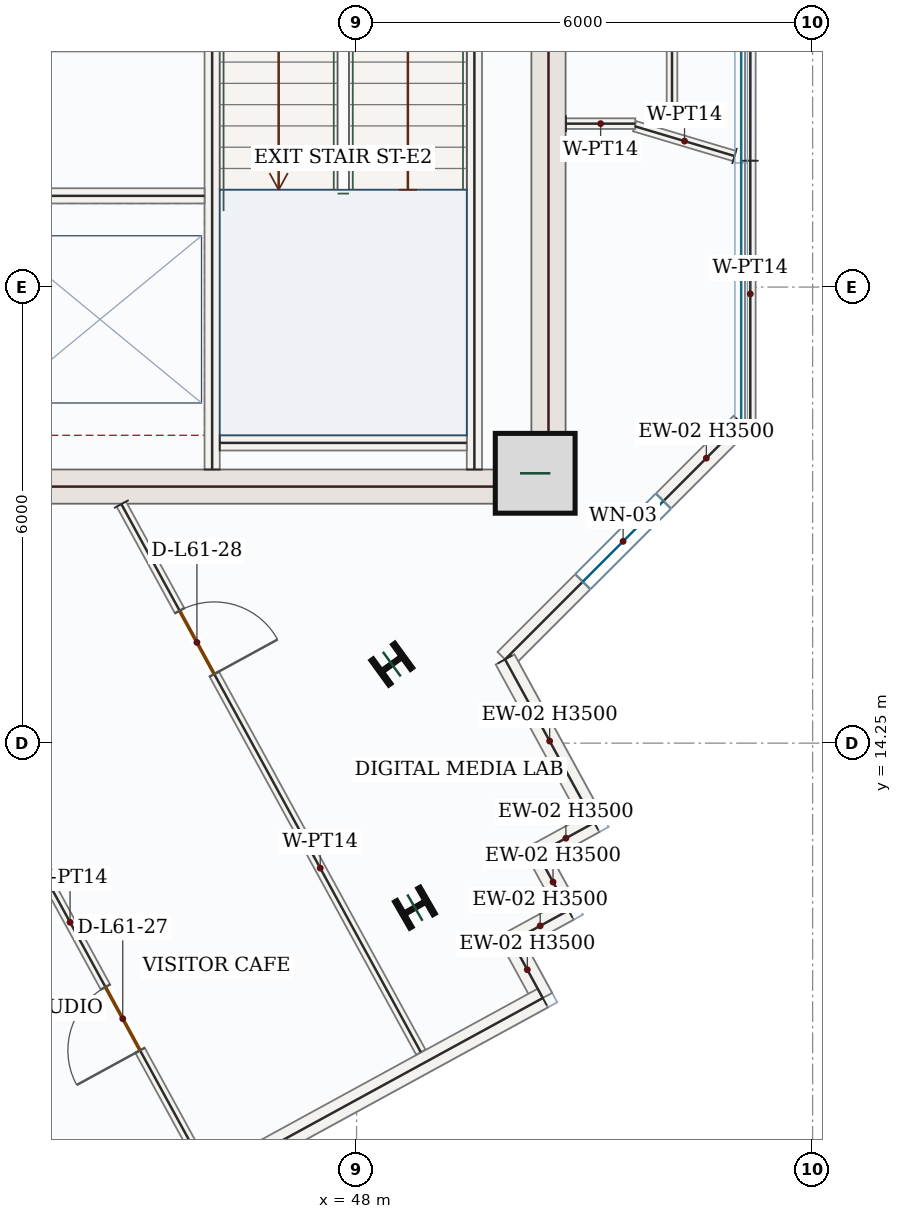
"""IFC4 building model, lengths in metres.
Left out: names, types, materials, properties, quantities, classifications, styles, units other than length and angle.
Written with IfcOpenShell. Run it as: python <this file> out.ifc"""

import sys

from ifc_helpers import new_model, si_unit, direction, frame, frame_2d, origin, origin_2d, place, context, subcontext, project, spatial, rectangle, i_section, extrude, source, transform, mapped, element, fill, save


model = new_model("IFC4")
c1 = context("Model", 3, precision=1e-05, world=origin(), true_north=direction((0.0, 1.0)))
c2 = subcontext(c1, "Body", "Model", "MODEL_VIEW")
j1 = project(units=[si_unit("LENGTHUNIT", "METRE"), si_unit("PLANEANGLEUNIT", "RADIAN")], contexts=[c1])
p1 = place(None, origin())
s1 = spatial("IfcSite", under=j1, at=p1, CompositionType="ELEMENT")
p2 = place(p1, origin())
s2 = spatial("IfcBuilding", under=s1, at=p2, CompositionType="ELEMENT")
p3 = place(p2, frame((0.0, 0.0, 257.85)))
s3 = spatial("IfcBuildingStorey", under=s2, at=p3, CompositionType="ELEMENT", Elevation=257.85)
m1 = source(origin(), c2, "Body", "SweptSolid", [
    extrude(rectangle(XDim=8.55, YDim=0.45, at=frame_2d((4.275, 0.0))), origin(), (0.0, 0.0, 1.0), 3.5),
])
p4 = place(p3, frame((50.525, 17.4, 0.0), z_axis=(0.0, 0.0, 1.0), x_axis=(0.0, 1.0, 0.0)))
e1 = element("IfcWall", 1, at=p4, inside=s3, PredefinedType="SHEAR", context=c2, shape_type="MappedRepresentation", body=[
    mapped(m1, transform((0.0, 0.0, 0.0), x_axis=(1.0, 0.0, 0.0), y_axis=(0.0, 1.0, 0.0), z_axis=(0.0, 0.0, 1.0), scale=1.0)),
])
m2 = source(origin(), c2, "Body", "SweptSolid", [
    extrude(rectangle(XDim=7.1, YDim=0.45, at=frame_2d((3.55, 0.0))), origin(), (0.0, 0.0, 1.0), 3.5),
])
p5 = place(p3, frame((43.2, 17.625, 0.0), z_axis=(0.0, 0.0, 1.0), x_axis=(1.0, 0.0, 0.0)))
e2 = element("IfcWall", 2, at=p5, inside=s3, PredefinedType="SHEAR", context=c2, shape_type="MappedRepresentation", body=[
    mapped(m2, transform((0.0, 0.0, 0.0), x_axis=(1.0, 0.0, 0.0), y_axis=(0.0, 1.0, 0.0), z_axis=(0.0, 0.0, 1.0), scale=1.0)),
])
m3 = source(origin(), c2, "Body", "SweptSolid", [
    extrude(rectangle(XDim=1.05, YDim=1.05, at=origin_2d()), origin(), (0.0, 0.0, 1.0), 3.75),
])
p6 = place(p3, frame((50.35, 17.8, 0.0), z_axis=(0.0, 0.0, 1.0), x_axis=(1.0, 0.0, 0.0)))
e3 = element("IfcColumn", 3, at=p6, inside=s3, PredefinedType="COLUMN", context=c2, shape_type="MappedRepresentation", body=[
    mapped(m3, transform((0.0, 0.0, 0.0), x_axis=(1.0, 0.0, 0.0), y_axis=(0.0, 1.0, 0.0), z_axis=(0.0, 0.0, 1.0), scale=1.0)),
])
m4 = source(origin(), c2, "Body", "SweptSolid", [
    extrude(i_section(OverallWidth=0.399, OverallDepth=0.386, WebThickness=0.021, FlangeThickness=0.033, FilletRadius=0.018, at=origin_2d()), origin(), (0.0, 0.0, 1.0), 3.75),
])
for number, where, z_axis, x_axis in (
    (4, (48.464, 15.289, 0.0), (0.0, 0.0, 1.0), (-0.588, 0.809, 0.0)),
    (5, (48.768, 12.086, 0.0), (0.0, 0.0, 1.0), (-0.5, 0.866, 0.0)),
):
    element("IfcColumn", number, at=place(p3, frame(where, z_axis=z_axis, x_axis=x_axis)), inside=s3, PredefinedType="COLUMN", context=c2, shape_type="MappedRepresentation", body=[
        mapped(m4, transform((0.0, 0.0, 0.0), x_axis=(1.0, 0.0, 0.0), y_axis=(0.0, 1.0, 0.0), z_axis=(0.0, 0.0, 1.0), scale=1.0)),
    ])
p7 = place(p3, frame((53.06, 18.458, 0.0), z_axis=(0.0, 0.0, 1.0), x_axis=(-0.707106781187, -0.707106781187, 0.0)))
e6 = element("IfcWall", 6, at=p7, inside=s3, PredefinedType="SOLIDWALL", context=c2, shape_type="SweptSolid", body=[
    extrude(rectangle(XDim=4.394, YDim=0.28, at=frame_2d((2.197, 0.0))), origin(), (0.0, 0.0, 1.0), 3.5),
])
p8 = place(p7, frame((1.447, 0.0, 0.85)))
e7 = element("IfcOpeningElement", 7, at=p8, cuts=e6, PredefinedType="OPENING", context=c2, shape_type="SweptSolid", body=[
    extrude(rectangle(XDim=1.5, YDim=1.5, at=frame_2d((0.75, 0.75))), frame((0.0, 0.15, 0.0), z_axis=(0.0, -1.0, 0.0), x_axis=(1.0, 0.0, 0.0)), (0.0, 0.0, 1.0), 0.3),
])
m5 = source(origin(), c2, "Body", "SweptSolid", [
    extrude(rectangle(XDim=2.448, YDim=0.28, at=frame_2d((1.224, 0.0))), origin(), (0.0, 0.0, 1.0), 3.5),
])
p9 = place(p3, frame((49.953, 15.351, 0.0), z_axis=(0.0, 0.0, 1.0), x_axis=(0.47951595933, -0.877533158774, 0.0)))
e8 = element("IfcWall", 8, at=p9, inside=s3, PredefinedType="SOLIDWALL", context=c2, shape_type="MappedRepresentation", body=[
    mapped(m5, transform((0.0, 0.0, 0.0), x_axis=(1.0, 0.0, 0.0), y_axis=(0.0, 1.0, 0.0), z_axis=(0.0, 0.0, 1.0), scale=1.0)),
])
m6 = source(origin(), c2, "Body", "SweptSolid", [
    extrude(rectangle(XDim=0.85, YDim=0.28, at=frame_2d((0.425, 0.0))), origin(), (0.0, 0.0, 1.0), 3.5),
])
p10 = place(p3, frame((51.127, 13.204, 0.0), z_axis=(0.0, 0.0, 1.0), x_axis=(-0.87752219781, -0.479536017782, 0.0)))
e9 = element("IfcWall", 9, at=p10, inside=s3, PredefinedType="SOLIDWALL", context=c2, shape_type="MappedRepresentation", body=[
    mapped(m6, transform((0.0, 0.0, 0.0), x_axis=(1.0, 0.0, 0.0), y_axis=(0.0, 1.0, 0.0), z_axis=(0.0, 0.0, 1.0), scale=1.0)),
])
m7 = source(origin(), c2, "Body", "SweptSolid", [
    extrude(rectangle(XDim=0.85, YDim=0.28, at=frame_2d((0.425, 0.0))), origin(), (0.0, 0.0, 1.0), 3.5),
])
for number, where, z_axis, x_axis in (
    (10, (50.381, 12.796, 0.0), (0.0, 0.0, 1.0), (0.48, -0.877, 0.0)),
    (11, (50.789, 12.05, 0.0), (0.0, 0.0, 1.0), (-0.878, -0.479, 0.0)),
):
    element("IfcWall", number, at=place(p3, frame(where, z_axis=z_axis, x_axis=x_axis)), inside=s3, PredefinedType="SOLIDWALL", context=c2, shape_type="MappedRepresentation", body=[
        mapped(m7, transform((0.0, 0.0, 0.0), x_axis=(1.0, 0.0, 0.0), y_axis=(0.0, 1.0, 0.0), z_axis=(0.0, 0.0, 1.0), scale=1.0)),
    ])
p11 = place(p3, frame((50.042, 11.643, 0.0), z_axis=(0.0, 0.0, 1.0), x_axis=(0.479536017782, -0.87752219781, 0.0)))
e12 = element("IfcWall", 12, at=p11, inside=s3, PredefinedType="SOLIDWALL", context=c2, shape_type="MappedRepresentation", body=[
    mapped(m6, transform((0.0, 0.0, 0.0), x_axis=(1.0, 0.0, 0.0), y_axis=(0.0, 1.0, 0.0), z_axis=(0.0, 0.0, 1.0), scale=1.0)),
])
m8 = source(origin(), c2, "Body", "SweptSolid", [
    extrude(rectangle(XDim=9.92, YDim=0.28, at=frame_2d((4.96, 0.0))), origin(), (0.0, 0.0, 1.0), 3.5),
])
p12 = place(p3, frame((50.45, 10.896, 0.0), z_axis=(0.0, 0.0, 1.0), x_axis=(-0.877572768104, -0.479443465574, 0.0)))
e13 = element("IfcWall", 13, at=p12, inside=s3, PredefinedType="SOLIDWALL", context=c2, shape_type="MappedRepresentation", body=[
    mapped(m8, transform((0.0, 0.0, 0.0), x_axis=(1.0, 0.0, 0.0), y_axis=(0.0, 1.0, 0.0), z_axis=(0.0, 0.0, 1.0), scale=1.0)),
])
m9 = source(origin(), c2, "Body", "SweptSolid", [
    extrude(rectangle(XDim=7.87, YDim=0.2, at=frame_2d((3.935, 0.0))), origin(), (0.0, 0.0, 1.0), 3.5),
])
p13 = place(p3, frame((49.55, 17.85, 0.0), z_axis=(0.0, 0.0, 1.0), x_axis=(0.0, 1.0, 0.0)))
e14 = element("IfcWall", 14, at=p13, inside=s3, PredefinedType="SOLIDWALL", context=c2, shape_type="MappedRepresentation", body=[
    mapped(m9, transform((0.0, 0.0, 0.0), x_axis=(1.0, 0.0, 0.0), y_axis=(0.0, 1.0, 0.0), z_axis=(0.0, 0.0, 1.0), scale=1.0)),
])
p14 = place(p3, frame((46.1, 17.85, 0.0), z_axis=(0.0, 0.0, 1.0), x_axis=(0.0, 1.0, 0.0)))
e15 = element("IfcWall", 15, at=p14, inside=s3, PredefinedType="SOLIDWALL", context=c2, shape_type="SweptSolid", body=[
    extrude(rectangle(XDim=8.0, YDim=0.2, at=frame_2d((4.0, 0.0))), origin(), (0.0, 0.0, 1.0), 3.5),
])
p15 = place(p14, frame((6.3, 0.0, 0.0)))
e16 = element("IfcOpeningElement", 16, at=p15, cuts=e15, PredefinedType="OPENING", context=c2, shape_type="SweptSolid", body=[
    extrude(rectangle(XDim=1.05, YDim=2.15, at=frame_2d((0.525, 1.075))), frame((0.0, 0.11, 0.0), z_axis=(0.0, -1.0, 0.0), x_axis=(1.0, 0.0, 0.0)), (0.0, 0.0, 1.0), 0.22),
])
m10 = source(origin(), c2, "Body", "SweptSolid", [
    extrude(rectangle(XDim=3.25, YDim=0.2, at=frame_2d((1.625, 0.0))), origin(), (0.0, 0.0, 1.0), 3.5),
])
p16 = place(p3, frame((46.2, 18.2, 0.0), z_axis=(0.0, 0.0, 1.0), x_axis=(1.0, 0.0, 0.0)))
e17 = element("IfcWall", 17, at=p16, inside=s3, PredefinedType="SOLIDWALL", context=c2, shape_type="MappedRepresentation", body=[
    mapped(m10, transform((0.0, 0.0, 0.0), x_axis=(1.0, 0.0, 0.0), y_axis=(0.0, 1.0, 0.0), z_axis=(0.0, 0.0, 1.0), scale=1.0)),
])
m11 = source(origin(), c2, "Body", "SweptSolid", [
    extrude(rectangle(XDim=2.75, YDim=0.2, at=frame_2d((1.375, 0.0))), origin(), (0.0, 0.0, 1.0), 3.5),
])
p17 = place(p3, frame((43.25, 21.45, 0.0), z_axis=(0.0, 0.0, 1.0), x_axis=(1.0, 0.0, 0.0)))
e18 = element("IfcWall", 18, at=p17, inside=s3, PredefinedType="SOLIDWALL", context=c2, shape_type="MappedRepresentation", body=[
    mapped(m11, transform((0.0, 0.0, 0.0), x_axis=(1.0, 0.0, 0.0), y_axis=(0.0, 1.0, 0.0), z_axis=(0.0, 0.0, 1.0), scale=1.0)),
])
p18 = place(p3, frame((44.906, 17.395, 0.0), z_axis=(0.0, 0.0, 1.0), x_axis=(0.479449534835, -0.877569452264, 0.0)))
e19 = element("IfcWall", 19, at=p18, inside=s3, PredefinedType="PARTITIONING", context=c2, shape_type="SweptSolid", body=[
    extrude(rectangle(XDim=8.216, YDim=0.14, at=frame_2d((4.108, 0.0))), origin(), (0.0, 0.0, 1.0), 3.5),
])
p19 = place(p18, frame((1.599, 0.0, 0.0)))
e20 = element("IfcOpeningElement", 20, at=p19, cuts=e19, PredefinedType="OPENING", context=c2, shape_type="SweptSolid", body=[
    extrude(rectangle(XDim=0.95, YDim=2.15, at=frame_2d((0.475, 1.075))), frame((0.0, 0.08, 0.0), z_axis=(0.0, -1.0, 0.0), x_axis=(1.0, 0.0, 0.0)), (0.0, 0.0, 1.0), 0.16),
])
p20 = place(p3, frame((46.01, 8.636, 0.0), z_axis=(0.0, 0.0, 1.0), x_axis=(-0.479410597023, 0.877590724348, 0.0)))
e21 = element("IfcWall", 21, at=p20, inside=s3, PredefinedType="PARTITIONING", context=c2, shape_type="SweptSolid", body=[
    extrude(rectangle(XDim=4.532, YDim=0.14, at=frame_2d((2.266, 0.0))), origin(), (0.0, 0.0, 1.0), 3.5),
])
p21 = place(p20, frame((1.791, 0.0, 0.0)))
e22 = element("IfcOpeningElement", 22, at=p21, cuts=e21, PredefinedType="OPENING", context=c2, shape_type="SweptSolid", body=[
    extrude(rectangle(XDim=0.95, YDim=2.15, at=frame_2d((0.475, 1.075))), frame((0.0, 0.08, 0.0), z_axis=(0.0, -1.0, 0.0), x_axis=(1.0, 0.0, 0.0)), (0.0, 0.0, 1.0), 0.16),
])
p22 = place(p3, frame((52.15, 22.406, 0.0), z_axis=(0.0, 0.0, 1.0), x_axis=(-2.657666e-05, 0.999999999647, 0.0)))
e23 = element("IfcWall", 23, at=p22, inside=s3, PredefinedType="PARTITIONING", context=c2, shape_type="SweptSolid", body=[
    extrude(rectangle(XDim=9.186, YDim=0.14, at=frame_2d((4.593, 0.0))), origin(), (0.0, 0.0, 1.0), 3.5),
])
p23 = place(p22, frame((2.883, 0.0, 0.0)))
e24 = element("IfcOpeningElement", 24, at=p23, cuts=e23, PredefinedType="OPENING", context=c2, shape_type="SweptSolid", body=[
    extrude(rectangle(XDim=0.95, YDim=2.15, at=frame_2d((0.475, 1.075))), frame((0.0, 0.08, 0.0), z_axis=(0.0, -1.0, 0.0), x_axis=(1.0, 0.0, 0.0)), (0.0, 0.0, 1.0), 0.16),
])
m12 = source(origin(), c2, "Body", "SweptSolid", [
    extrude(rectangle(XDim=6.722, YDim=0.14, at=frame_2d((3.361, 0.0))), origin(), (0.0, 0.0, 1.0), 3.5),
])
p24 = place(p3, frame((53.184, 28.634, 0.0), z_axis=(0.0, 0.0, 1.0), x_axis=(-0.000544820492, -0.999999851585, 0.0)))
e25 = element("IfcWall", 25, at=p24, inside=s3, PredefinedType="PARTITIONING", context=c2, shape_type="MappedRepresentation", body=[
    mapped(m12, transform((0.0, 0.0, 0.0), x_axis=(1.0, 0.0, 0.0), y_axis=(0.0, 1.0, 0.0), z_axis=(0.0, 0.0, 1.0), scale=1.0)),
])
m13 = source(origin(), c2, "Body", "SweptSolid", [
    extrude(rectangle(XDim=1.373, YDim=0.14, at=frame_2d((0.687, 0.0))), origin(), (0.0, 0.0, 1.0), 3.5),
])
p25 = place(p3, frame((52.972, 21.974, 0.0), z_axis=(0.0, 0.0, 1.0), x_axis=(-0.958236472503, 0.285977031883, 0.0)))
e26 = element("IfcWall", 26, at=p25, inside=s3, PredefinedType="PARTITIONING", context=c2, shape_type="MappedRepresentation", body=[
    mapped(m13, transform((0.0, 0.0, 0.0), x_axis=(1.0, 0.0, 0.0), y_axis=(0.0, 1.0, 0.0), z_axis=(0.0, 0.0, 1.0), scale=1.0)),
])
m14 = source(origin(), c2, "Body", "SweptSolid", [
    extrude(rectangle(XDim=0.912, YDim=0.14, at=frame_2d((0.456, 0.0))), origin(), (0.0, 0.0, 1.0), 3.5),
])
p26 = place(p3, frame((50.755, 22.4, 0.0), z_axis=(0.0, 0.0, 1.0), x_axis=(1.0, 0.0, 0.0)))
e27 = element("IfcWall", 27, at=p26, inside=s3, PredefinedType="PARTITIONING", context=c2, shape_type="MappedRepresentation", body=[
    mapped(m14, transform((0.0, 0.0, 0.0), x_axis=(1.0, 0.0, 0.0), y_axis=(0.0, 1.0, 0.0), z_axis=(0.0, 0.0, 1.0), scale=1.0)),
])
m15 = source(origin(), c2, "Body", "SweptSolid", [
    extrude(rectangle(XDim=3.504, YDim=0.14, at=frame_2d((1.752, 0.0))), origin(), (0.0, 0.0, 1.0), 3.5),
])
p27 = place(p3, frame((53.18, 21.912, 0.0), z_axis=(0.0, 0.0, 1.0), x_axis=(0.0, -1.0, 0.0)))
e28 = element("IfcWall", 28, at=p27, inside=s3, PredefinedType="PARTITIONING", context=c2, shape_type="MappedRepresentation", body=[
    mapped(m15, transform((0.0, 0.0, 0.0), x_axis=(1.0, 0.0, 0.0), y_axis=(0.0, 1.0, 0.0), z_axis=(0.0, 0.0, 1.0), scale=1.0)),
])
m16 = source(origin(), c2, "Body", "SweptSolid", [
    extrude(rectangle(XDim=1.5, YDim=1.5, at=frame_2d((0.75, 0.75))), frame((0.0, 0.03, 0.0), z_axis=(0.0, -1.0, 0.0), x_axis=(1.0, 0.0, 0.0)), (0.0, 0.0, 1.0), 0.06),
])
p28 = place(p8, origin())
e29 = element("IfcWindow", 29, at=p28, inside=s3, PartitioningType="SINGLE_PANEL", PredefinedType="WINDOW", context=c2, shape_type="MappedRepresentation", body=[
    mapped(m16, transform((0.0, 0.0, 0.0), x_axis=(1.0, 0.0, 0.0), y_axis=(0.0, 1.0, 0.0), z_axis=(0.0, 0.0, 1.0), scale=1.0)),
])
fill(e7, e29)
m17 = source(origin(), c2, "Body", "SweptSolid", [
    extrude(rectangle(XDim=0.95, YDim=2.15, at=frame_2d((0.475, 1.075))), frame((0.0, 0.025, 0.0), z_axis=(0.0, -1.0, 0.0), x_axis=(1.0, 0.0, 0.0)), (0.0, 0.0, 1.0), 0.05),
])
p29 = place(p21, origin())
e30 = element("IfcDoor", 30, at=p29, inside=s3, OperationType="SINGLE_SWING_LEFT", PredefinedType="DOOR", context=c2, shape_type="MappedRepresentation", body=[
    mapped(m17, transform((0.0, 0.0, 0.0), x_axis=(1.0, 0.0, 0.0), y_axis=(0.0, 1.0, 0.0), z_axis=(0.0, 0.0, 1.0), scale=1.0)),
])
fill(e22, e30)
p30 = place(p19, origin())
e31 = element("IfcDoor", 31, at=p30, inside=s3, OperationType="SINGLE_SWING_RIGHT", PredefinedType="DOOR", context=c2, shape_type="MappedRepresentation", body=[
    mapped(m17, transform((0.0, 0.0, 0.0), x_axis=(1.0, 0.0, 0.0), y_axis=(0.0, 1.0, 0.0), z_axis=(0.0, 0.0, 1.0), scale=1.0)),
])
fill(e20, e31)
save(model, sys.argv[1])
